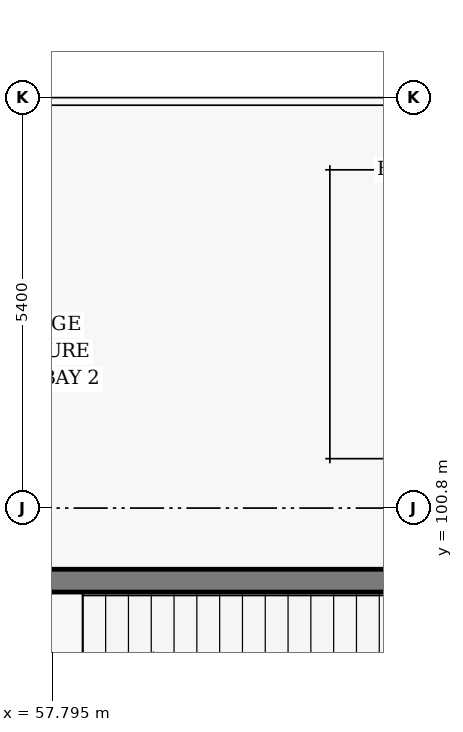
"""IFC4 building model, lengths in metres.
Left out: names, types, materials, properties, quantities, classifications, styles, units other than length and angle.
Written with IfcOpenShell. Run it as: python <this file> out.ifc"""

import sys

from ifc_helpers import new_model, si_unit, direction, frame, frame_2d, origin, place, context, subcontext, project, spatial, rectangle, extrude, element, save


model = new_model("IFC4")
c1 = context("Model", 3, precision=1e-05, world=origin(), true_north=direction((0.0, 1.0)))
c2 = subcontext(c1, "Body", "Model", "MODEL_VIEW")
j1 = project(units=[si_unit("LENGTHUNIT", "METRE"), si_unit("PLANEANGLEUNIT", "RADIAN")], contexts=[c1])
p1 = place(None, origin())
s1 = spatial("IfcSite", under=j1, at=p1, CompositionType="ELEMENT")
p2 = place(p1, origin())
s2 = spatial("IfcBuilding", under=s1, at=p2, CompositionType="ELEMENT")
p3 = place(p2, frame((0.0, 0.0, 6.6)))
s3 = spatial("IfcBuildingStorey", under=s2, at=p3, CompositionType="ELEMENT", Elevation=6.6)
p4 = place(p3, frame((55.355, 99.845, 0.0), z_axis=(0.0, 0.0, 1.0), x_axis=(1.0, 0.0, 0.0)))
e1 = element("IfcWall", 1, at=p4, inside=s3, PredefinedType="SOLIDWALL", context=c2, shape_type="SweptSolid", body=[
    extrude(rectangle(XDim=10.04, YDim=0.3, at=frame_2d((5.02, 0.0))), origin(), (0.0, 0.0, 1.0), 6.0),
])
save(model, sys.argv[1])
